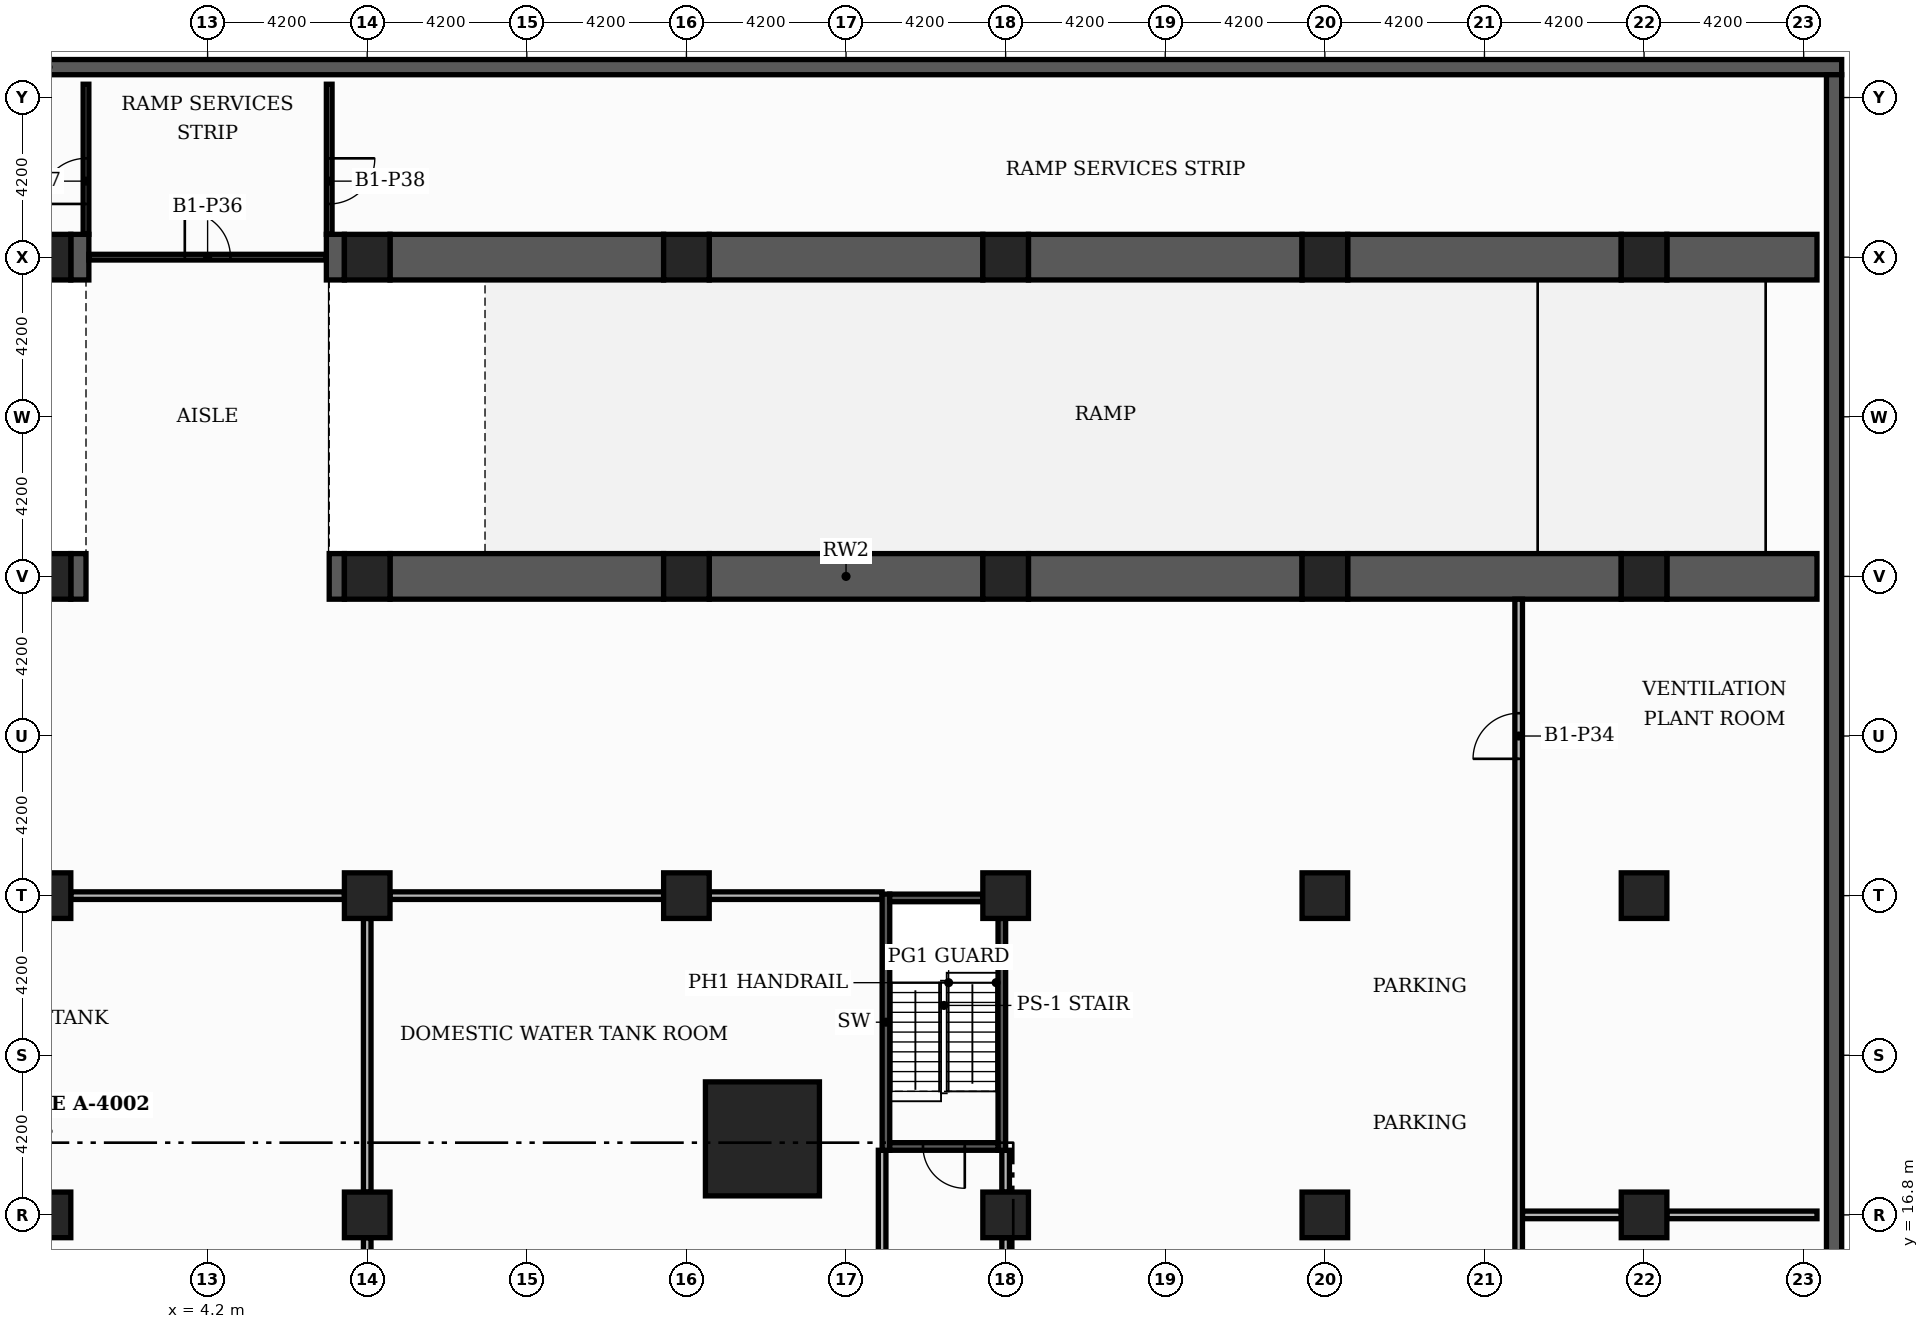
"""IFC4 building model, lengths in metres.
Left out: names, types, materials, properties, quantities, classifications, styles, units other than length and angle.
Written with IfcOpenShell. Run it as: python <this file> out.ifc"""

import sys

from ifc_helpers import new_model, si_unit, direction, frame, frame_2d, origin, origin_2d, place, context, subcontext, project, spatial, rectangle, extrude, element, fill, save


model = new_model("IFC4")
c1 = context("Model", 3, precision=1e-05, world=origin(), true_north=direction((0.0, 1.0)))
c2 = subcontext(c1, "Body", "Model", "MODEL_VIEW")
j1 = project(units=[si_unit("LENGTHUNIT", "METRE"), si_unit("PLANEANGLEUNIT", "RADIAN")], contexts=[c1])
p1 = place(None, origin())
s1 = spatial("IfcSite", under=j1, at=p1, CompositionType="ELEMENT")
p2 = place(p1, origin())
s2 = spatial("IfcBuilding", under=s1, at=p2, CompositionType="ELEMENT")
p3 = place(p2, frame((0.0, 0.0, -4.2)))
s3 = spatial("IfcBuildingStorey", under=s2, at=p3, CompositionType="ELEMENT", Elevation=-4.2)
p4 = place(p3, frame((-47.2, 47.0, 0.0), z_axis=(0.0, 0.0, 1.0), x_axis=(1.0, 0.0, 0.0)))
e1 = element("IfcWall", 1, at=p4, inside=s3, PredefinedType="USERDEFINED", context=c2, shape_type="SweptSolid", body=[
    extrude(rectangle(XDim=94.4, YDim=0.4, at=frame_2d((47.2, 0.0))), origin(), (0.0, 0.0, 1.0), 4.2),
])
p5 = place(p3, frame((47.0, -46.8, 0.0), z_axis=(0.0, 0.0, 1.0), x_axis=(0.0, 1.0, 0.0)))
e2 = element("IfcWall", 2, at=p5, inside=s3, PredefinedType="USERDEFINED", context=c2, shape_type="SweptSolid", body=[
    extrude(rectangle(XDim=93.6, YDim=0.4, at=frame_2d((46.8, 0.0))), origin(), (0.0, 0.0, 1.0), 4.2),
])
p6 = place(p3, frame((18.8, 18.8, 0.0), z_axis=(0.0, 0.0, 1.0), x_axis=(1.0, 0.0, 0.0)))
e3 = element("IfcColumn", 3, at=p6, inside=s3, PredefinedType="COLUMN", context=c2, shape_type="SweptSolid", body=[
    extrude(rectangle(XDim=3.0, YDim=3.0, at=origin_2d()), origin(), (0.0, 0.0, 1.0), 4.2),
])
for number, where, z_axis, x_axis in (
    (4, (25.2, 16.8, 0.0), (0.0, 0.0, 1.0), (1.0, 0.0, 0.0)),
    (5, (0.0, 25.2, 0.0), (0.0, 0.0, 1.0), (1.0, 0.0, 0.0)),
    (6, (8.4, 25.2, 0.0), (0.0, 0.0, 1.0), (1.0, 0.0, 0.0)),
    (7, (16.8, 25.2, 0.0), (0.0, 0.0, 1.0), (1.0, 0.0, 0.0)),
    (8, (0.0, 16.8, 0.0), (0.0, 0.0, 1.0), (1.0, 0.0, 0.0)),
    (9, (0.0, 33.6, 0.0), (0.0, 0.0, 1.0), (1.0, 0.0, 0.0)),
    (10, (0.0, 42.0, 0.0), (0.0, 0.0, 1.0), (1.0, 0.0, 0.0)),
    (11, (8.4, 16.8, 0.0), (0.0, 0.0, 1.0), (1.0, 0.0, 0.0)),
    (12, (8.4, 33.6, 0.0), (0.0, 0.0, 1.0), (1.0, 0.0, 0.0)),
    (13, (8.4, 42.0, 0.0), (0.0, 0.0, 1.0), (1.0, 0.0, 0.0)),
    (14, (16.8, 33.6, 0.0), (0.0, 0.0, 1.0), (1.0, 0.0, 0.0)),
    (15, (16.8, 42.0, 0.0), (0.0, 0.0, 1.0), (1.0, 0.0, 0.0)),
    (16, (25.2, 25.2, 0.0), (0.0, 0.0, 1.0), (1.0, 0.0, 0.0)),
    (17, (25.2, 33.6, 0.0), (0.0, 0.0, 1.0), (1.0, 0.0, 0.0)),
    (18, (25.2, 42.0, 0.0), (0.0, 0.0, 1.0), (1.0, 0.0, 0.0)),
    (19, (33.6, 16.8, 0.0), (0.0, 0.0, 1.0), (1.0, 0.0, 0.0)),
    (20, (33.6, 25.2, 0.0), (0.0, 0.0, 1.0), (1.0, 0.0, 0.0)),
    (21, (33.6, 33.6, 0.0), (0.0, 0.0, 1.0), (1.0, 0.0, 0.0)),
    (22, (33.6, 42.0, 0.0), (0.0, 0.0, 1.0), (1.0, 0.0, 0.0)),
    (23, (42.0, 16.8, 0.0), (0.0, 0.0, 1.0), (1.0, 0.0, 0.0)),
    (24, (42.0, 25.2, 0.0), (0.0, 0.0, 1.0), (1.0, 0.0, 0.0)),
    (25, (42.0, 33.6, 0.0), (0.0, 0.0, 1.0), (1.0, 0.0, 0.0)),
    (26, (42.0, 42.0, 0.0), (0.0, 0.0, 1.0), (1.0, 0.0, 0.0)),
):
    element("IfcColumn", number, at=place(p3, frame(where, z_axis=z_axis, x_axis=x_axis)), inside=s3, PredefinedType="COLUMN", context=c2, shape_type="SweptSolid", body=[
        extrude(rectangle(XDim=1.2, YDim=1.2, at=origin_2d()), origin(), (0.0, 0.0, 1.0), 4.2),
    ])
p7 = place(p3, frame((38.8, 16.8, 0.0), z_axis=(0.0, 0.0, 1.0), x_axis=(1.0, 0.0, 0.0)))
e27 = element("IfcWall", 27, at=p7, inside=s3, PredefinedType="PARTITIONING", context=c2, shape_type="SweptSolid", body=[
    extrude(rectangle(XDim=2.6, YDim=0.2, at=frame_2d((1.3, 0.0))), origin(), (0.0, 0.0, 1.0), 3.78),
])
p8 = place(p3, frame((42.6, 16.8, 0.0), z_axis=(0.0, 0.0, 1.0), x_axis=(1.0, 0.0, 0.0)))
e28 = element("IfcWall", 28, at=p8, inside=s3, PredefinedType="PARTITIONING", context=c2, shape_type="SweptSolid", body=[
    extrude(rectangle(XDim=3.95, YDim=0.2, at=frame_2d((1.975, 0.0))), origin(), (0.0, 0.0, 1.0), 3.78),
])
for number, where, z_axis, x_axis in (
    (29, (0.6, 25.2, 0.0), (0.0, 0.0, 1.0), (1.0, 0.0, 0.0)),
    (30, (9.0, 25.2, 0.0), (0.0, 0.0, 1.0), (1.0, 0.0, 0.0)),
):
    element("IfcWall", number, at=place(p3, frame(where, z_axis=z_axis, x_axis=x_axis)), inside=s3, PredefinedType="PARTITIONING", context=c2, shape_type="SweptSolid", body=[
        extrude(rectangle(XDim=7.2, YDim=0.2, at=frame_2d((3.6, 0.0))), origin(), (0.0, 0.0, 1.0), 3.78),
    ])
p9 = place(p3, frame((17.4, 25.2, 0.0), z_axis=(0.0, 0.0, 1.0), x_axis=(1.0, 0.0, 0.0)))
e31 = element("IfcWall", 31, at=p9, inside=s3, PredefinedType="PARTITIONING", context=c2, shape_type="SweptSolid", body=[
    extrude(rectangle(XDim=4.55, YDim=0.2, at=frame_2d((2.275, 0.0))), origin(), (0.0, 0.0, 1.0), 3.78),
])
p10 = place(p3, frame((0.6, 33.6, 0.0), z_axis=(0.0, 0.0, 1.0), x_axis=(1.0, 0.0, 0.0)))
e32 = element("IfcWall", 32, at=p10, inside=s3, PredefinedType="SOLIDWALL", context=c2, shape_type="SweptSolid", body=[
    extrude(rectangle(XDim=0.4, YDim=1.2, at=frame_2d((0.2, 0.0))), origin(), (0.0, 0.0, 1.0), 3.78),
])
p11 = place(p3, frame((7.4, 33.6, 0.0), z_axis=(0.0, 0.0, 1.0), x_axis=(1.0, 0.0, 0.0)))
e33 = element("IfcWall", 33, at=p11, inside=s3, PredefinedType="SOLIDWALL", context=c2, shape_type="SweptSolid", body=[
    extrude(rectangle(XDim=0.4, YDim=1.2, at=frame_2d((0.2, 0.0))), origin(), (0.0, 0.0, 1.0), 3.78),
])
p12 = place(p3, frame((9.0, 33.6, 0.0), z_axis=(0.0, 0.0, 1.0), x_axis=(1.0, 0.0, 0.0)))
e34 = element("IfcWall", 34, at=p12, inside=s3, PredefinedType="SOLIDWALL", context=c2, shape_type="SweptSolid", body=[
    extrude(rectangle(XDim=7.2, YDim=1.2, at=frame_2d((3.6, 0.0))), origin(), (0.0, 0.0, 1.0), 3.78),
])
p13 = place(p3, frame((17.4, 33.6, 0.0), z_axis=(0.0, 0.0, 1.0), x_axis=(1.0, 0.0, 0.0)))
e35 = element("IfcWall", 35, at=p13, inside=s3, PredefinedType="SOLIDWALL", context=c2, shape_type="SweptSolid", body=[
    extrude(rectangle(XDim=7.2, YDim=1.2, at=frame_2d((3.6, 0.0))), origin(), (0.0, 0.0, 1.0), 3.78),
])
for number, where, z_axis, x_axis in (
    (36, (25.8, 33.6, 0.0), (0.0, 0.0, 1.0), (1.0, 0.0, 0.0)),
    (37, (34.2, 33.6, 0.0), (0.0, 0.0, 1.0), (1.0, 0.0, 0.0)),
):
    element("IfcWall", number, at=place(p3, frame(where, z_axis=z_axis, x_axis=x_axis)), inside=s3, PredefinedType="SOLIDWALL", context=c2, shape_type="SweptSolid", body=[
        extrude(rectangle(XDim=7.2, YDim=1.2, at=frame_2d((3.6, 0.0))), origin(), (0.0, 0.0, 1.0), 3.78),
    ])
p14 = place(p3, frame((42.6, 33.6, 0.0), z_axis=(0.0, 0.0, 1.0), x_axis=(1.0, 0.0, 0.0)))
e38 = element("IfcWall", 38, at=p14, inside=s3, PredefinedType="SOLIDWALL", context=c2, shape_type="SweptSolid", body=[
    extrude(rectangle(XDim=3.95, YDim=1.2, at=frame_2d((1.975, 0.0))), origin(), (0.0, 0.0, 1.0), 3.78),
])
p15 = place(p3, frame((0.6, 42.0, 0.0), z_axis=(0.0, 0.0, 1.0), x_axis=(1.0, 0.0, 0.0)))
e39 = element("IfcWall", 39, at=p15, inside=s3, PredefinedType="SOLIDWALL", context=c2, shape_type="SweptSolid", body=[
    extrude(rectangle(XDim=0.475, YDim=1.2, at=frame_2d((0.237, 0.0))), origin(), (0.0, 0.0, 1.0), 3.78),
])
p16 = place(p3, frame((1.075, 42.0, 0.0), z_axis=(0.0, 0.0, 1.0), x_axis=(1.0, 0.0, 0.0)))
e40 = element("IfcWall", 40, at=p16, inside=s3, PredefinedType="PARTITIONING", context=c2, shape_type="SweptSolid", body=[
    extrude(rectangle(XDim=6.25, YDim=0.15, at=frame_2d((3.125, 0.0))), origin(), (0.0, 0.0, 1.0), 3.78),
])
p17 = place(p16, frame((2.525, 0.0, 0.0)))
e41 = element("IfcOpeningElement", 41, at=p17, cuts=e40, PredefinedType="OPENING", context=c2, shape_type="SweptSolid", body=[
    extrude(rectangle(XDim=1.2, YDim=2.2, at=frame_2d((0.6, 1.1))), frame((0.0, 0.085, 0.0), z_axis=(0.0, -1.0, 0.0), x_axis=(1.0, 0.0, 0.0)), (0.0, 0.0, 1.0), 0.17),
])
p18 = place(p3, frame((7.325, 42.0, 0.0), z_axis=(0.0, 0.0, 1.0), x_axis=(1.0, 0.0, 0.0)))
e42 = element("IfcWall", 42, at=p18, inside=s3, PredefinedType="SOLIDWALL", context=c2, shape_type="SweptSolid", body=[
    extrude(rectangle(XDim=0.475, YDim=1.2, at=frame_2d((0.238, 0.0))), origin(), (0.0, 0.0, 1.0), 3.78),
])
p19 = place(p3, frame((9.0, 42.0, 0.0), z_axis=(0.0, 0.0, 1.0), x_axis=(1.0, 0.0, 0.0)))
e43 = element("IfcWall", 43, at=p19, inside=s3, PredefinedType="SOLIDWALL", context=c2, shape_type="SweptSolid", body=[
    extrude(rectangle(XDim=7.2, YDim=1.2, at=frame_2d((3.6, 0.0))), origin(), (0.0, 0.0, 1.0), 3.78),
])
p20 = place(p3, frame((17.4, 42.0, 0.0), z_axis=(0.0, 0.0, 1.0), x_axis=(1.0, 0.0, 0.0)))
e44 = element("IfcWall", 44, at=p20, inside=s3, PredefinedType="SOLIDWALL", context=c2, shape_type="SweptSolid", body=[
    extrude(rectangle(XDim=7.2, YDim=1.2, at=frame_2d((3.6, 0.0))), origin(), (0.0, 0.0, 1.0), 3.78),
])
for number, where, z_axis, x_axis in (
    (45, (25.8, 42.0, 0.0), (0.0, 0.0, 1.0), (1.0, 0.0, 0.0)),
    (46, (34.2, 42.0, 0.0), (0.0, 0.0, 1.0), (1.0, 0.0, 0.0)),
):
    element("IfcWall", number, at=place(p3, frame(where, z_axis=z_axis, x_axis=x_axis)), inside=s3, PredefinedType="SOLIDWALL", context=c2, shape_type="SweptSolid", body=[
        extrude(rectangle(XDim=7.2, YDim=1.2, at=frame_2d((3.6, 0.0))), origin(), (0.0, 0.0, 1.0), 3.78),
    ])
p21 = place(p3, frame((42.6, 42.0, 0.0), z_axis=(0.0, 0.0, 1.0), x_axis=(1.0, 0.0, 0.0)))
e47 = element("IfcWall", 47, at=p21, inside=s3, PredefinedType="SOLIDWALL", context=c2, shape_type="SweptSolid", body=[
    extrude(rectangle(XDim=3.95, YDim=1.2, at=frame_2d((1.975, 0.0))), origin(), (0.0, 0.0, 1.0), 3.78),
])
p22 = place(p3, frame((1.0, 42.6, 0.0), z_axis=(0.0, 0.0, 1.0), x_axis=(0.0, 1.0, 0.0)))
e48 = element("IfcWall", 48, at=p22, inside=s3, PredefinedType="PARTITIONING", context=c2, shape_type="SweptSolid", body=[
    extrude(rectangle(XDim=3.95, YDim=0.15, at=frame_2d((1.975, 0.0))), origin(), (0.0, 0.0, 1.0), 3.78),
])
p23 = place(p22, frame((0.8, 0.0, 0.0)))
e49 = element("IfcOpeningElement", 49, at=p23, cuts=e48, PredefinedType="OPENING", context=c2, shape_type="SweptSolid", body=[
    extrude(rectangle(XDim=1.2, YDim=2.2, at=frame_2d((0.6, 1.1))), frame((0.0, 0.085, 0.0), z_axis=(0.0, -1.0, 0.0), x_axis=(1.0, 0.0, 0.0)), (0.0, 0.0, 1.0), 0.17),
])
p24 = place(p3, frame((7.4, 42.6, 0.0), z_axis=(0.0, 0.0, 1.0), x_axis=(0.0, 1.0, 0.0)))
e50 = element("IfcWall", 50, at=p24, inside=s3, PredefinedType="PARTITIONING", context=c2, shape_type="SweptSolid", body=[
    extrude(rectangle(XDim=3.95, YDim=0.15, at=frame_2d((1.975, 0.0))), origin(), (0.0, 0.0, 1.0), 3.78),
])
p25 = place(p24, frame((0.8, 0.0, 0.0)))
e51 = element("IfcOpeningElement", 51, at=p25, cuts=e50, PredefinedType="OPENING", context=c2, shape_type="SweptSolid", body=[
    extrude(rectangle(XDim=1.2, YDim=2.2, at=frame_2d((0.6, 1.1))), frame((0.0, 0.085, 0.0), z_axis=(0.0, -1.0, 0.0), x_axis=(1.0, 0.0, 0.0)), (0.0, 0.0, 1.0), 0.17),
])
p26 = place(p3, frame((8.4, 14.5, 0.0), z_axis=(0.0, 0.0, 1.0), x_axis=(0.0, 1.0, 0.0)))
e52 = element("IfcWall", 52, at=p26, inside=s3, PredefinedType="PARTITIONING", context=c2, shape_type="SweptSolid", body=[
    extrude(rectangle(XDim=1.7, YDim=0.2, at=frame_2d((0.85, 0.0))), origin(), (0.0, 0.0, 1.0), 3.78),
])
p27 = place(p3, frame((8.4, 17.4, 0.0), z_axis=(0.0, 0.0, 1.0), x_axis=(0.0, 1.0, 0.0)))
e53 = element("IfcWall", 53, at=p27, inside=s3, PredefinedType="PARTITIONING", context=c2, shape_type="SweptSolid", body=[
    extrude(rectangle(XDim=7.2, YDim=0.2, at=frame_2d((3.6, 0.0))), origin(), (0.0, 0.0, 1.0), 3.78),
])
p28 = place(p3, frame((21.95, 14.5, 0.0), z_axis=(0.0, 0.0, 1.0), x_axis=(0.0, 1.0, 0.0)))
e54 = element("IfcWall", 54, at=p28, inside=s3, PredefinedType="PARTITIONING", context=c2, shape_type="SweptSolid", body=[
    extrude(rectangle(XDim=4.0, YDim=0.2, at=frame_2d((2.0, 0.0))), origin(), (0.0, 0.0, 1.0), 3.78),
])
p29 = place(p3, frame((25.2, 14.5, 0.0), z_axis=(0.0, 0.0, 1.0), x_axis=(0.0, 1.0, 0.0)))
e55 = element("IfcWall", 55, at=p29, inside=s3, PredefinedType="PARTITIONING", context=c2, shape_type="SweptSolid", body=[
    extrude(rectangle(XDim=1.7, YDim=0.2, at=frame_2d((0.85, 0.0))), origin(), (0.0, 0.0, 1.0), 3.78),
])
p30 = place(p3, frame((25.2, 17.4, 0.0), z_axis=(0.0, 0.0, 1.0), x_axis=(0.0, 1.0, 0.0)))
e56 = element("IfcWall", 56, at=p30, inside=s3, PredefinedType="PARTITIONING", context=c2, shape_type="SweptSolid", body=[
    extrude(rectangle(XDim=1.1, YDim=0.2, at=frame_2d((0.55, 0.0))), origin(), (0.0, 0.0, 1.0), 3.78),
])
p31 = place(p3, frame((38.7, -38.6, 0.0), z_axis=(0.0, 0.0, 1.0), x_axis=(0.0, 1.0, 0.0)))
e57 = element("IfcWall", 57, at=p31, inside=s3, PredefinedType="PARTITIONING", context=c2, shape_type="SweptSolid", body=[
    extrude(rectangle(XDim=71.6, YDim=0.2, at=frame_2d((35.8, 0.0))), origin(), (0.0, 0.0, 1.0), 3.78),
])
p32 = place(p31, frame((8.6, 0.0, 0.0)))
e58 = element("IfcOpeningElement", 58, at=p32, cuts=e57, PredefinedType="OPENING", context=c2, shape_type="SweptSolid", body=[
    extrude(rectangle(XDim=1.2, YDim=2.2, at=frame_2d((0.6, 1.1))), frame((0.0, 0.11, 0.0), z_axis=(0.0, -1.0, 0.0), x_axis=(1.0, 0.0, 0.0)), (0.0, 0.0, 1.0), 0.22),
])
p33 = place(p31, frame((33.8, 0.0, 0.0)))
e59 = element("IfcOpeningElement", 59, at=p33, cuts=e57, PredefinedType="OPENING", context=c2, shape_type="SweptSolid", body=[
    extrude(rectangle(XDim=1.2, YDim=2.2, at=frame_2d((0.6, 1.1))), frame((0.0, 0.11, 0.0), z_axis=(0.0, -1.0, 0.0), x_axis=(1.0, 0.0, 0.0)), (0.0, 0.0, 1.0), 0.22),
])
p34 = place(p31, frame((50.6, 0.0, 0.0)))
e60 = element("IfcOpeningElement", 60, at=p34, cuts=e57, PredefinedType="OPENING", context=c2, shape_type="SweptSolid", body=[
    extrude(rectangle(XDim=1.2, YDim=2.2, at=frame_2d((0.6, 1.1))), frame((0.0, 0.11, 0.0), z_axis=(0.0, -1.0, 0.0), x_axis=(1.0, 0.0, 0.0)), (0.0, 0.0, 1.0), 0.22),
])
p35 = place(p31, frame((67.4, 0.0, 0.0)))
e61 = element("IfcOpeningElement", 61, at=p35, cuts=e57, PredefinedType="OPENING", context=c2, shape_type="SweptSolid", body=[
    extrude(rectangle(XDim=1.2, YDim=2.2, at=frame_2d((0.6, 1.1))), frame((0.0, 0.11, 0.0), z_axis=(0.0, -1.0, 0.0), x_axis=(1.0, 0.0, 0.0)), (0.0, 0.0, 1.0), 0.22),
])
p36 = place(p3, frame((22.05, 18.5, 0.0), z_axis=(0.0, 0.0, 1.0), x_axis=(0.0, 1.0, 0.0)))
e62 = element("IfcWall", 62, at=p36, inside=s3, PredefinedType="SOLIDWALL", context=c2, shape_type="SweptSolid", body=[
    extrude(rectangle(XDim=6.74, YDim=0.2, at=frame_2d((3.37, 0.0))), origin(), (0.0, 0.0, 1.0), 3.78),
])
p37 = place(p3, frame((25.1, 18.5, 0.0), z_axis=(0.0, 0.0, 1.0), x_axis=(0.0, 1.0, 0.0)))
e63 = element("IfcWall", 63, at=p37, inside=s3, PredefinedType="SOLIDWALL", context=c2, shape_type="SweptSolid", body=[
    extrude(rectangle(XDim=6.1, YDim=0.2, at=frame_2d((3.05, 0.0))), origin(), (0.0, 0.0, 1.0), 3.78),
])
p38 = place(p3, frame((22.15, 18.6, 0.0), z_axis=(0.0, 0.0, 1.0), x_axis=(1.0, 0.0, 0.0)))
e64 = element("IfcWall", 64, at=p38, inside=s3, PredefinedType="SOLIDWALL", context=c2, shape_type="SweptSolid", body=[
    extrude(rectangle(XDim=2.85, YDim=0.2, at=frame_2d((1.425, 0.0))), origin(), (0.0, 0.0, 1.0), 3.78),
])
p39 = place(p38, frame((0.875, 0.0, 0.0)))
e65 = element("IfcOpeningElement", 65, at=p39, cuts=e64, PredefinedType="OPENING", context=c2, shape_type="SweptSolid", body=[
    extrude(rectangle(XDim=1.1, YDim=2.2, at=frame_2d((0.55, 1.1))), frame((0.0, 0.11, 0.0), z_axis=(0.0, -1.0, 0.0), x_axis=(1.0, 0.0, 0.0)), (0.0, 0.0, 1.0), 0.22),
])
p40 = place(p3, frame((22.15, 25.14, 0.0), z_axis=(0.0, 0.0, 1.0), x_axis=(1.0, 0.0, 0.0)))
e66 = element("IfcWall", 66, at=p40, inside=s3, PredefinedType="SOLIDWALL", context=c2, shape_type="SweptSolid", body=[
    extrude(rectangle(XDim=2.45, YDim=0.2, at=frame_2d((1.225, 0.0))), origin(), (0.0, 0.0, 1.0), 3.78),
])
p41 = place(p35, origin())
e67 = element("IfcDoor", 67, at=p41, inside=s3, OperationType="SINGLE_SWING_LEFT", PredefinedType="DOOR", context=c2, shape_type="SweptSolid", body=[
    extrude(rectangle(XDim=1.2, YDim=2.2, at=frame_2d((0.6, 1.1))), frame((0.0, 0.025, 0.0), z_axis=(0.0, -1.0, 0.0), x_axis=(1.0, 0.0, 0.0)), (0.0, 0.0, 1.0), 0.05),
])
fill(e61, e67)
p42 = place(p17, origin())
e68 = element("IfcDoor", 68, at=p42, inside=s3, OperationType="SINGLE_SWING_LEFT", PredefinedType="DOOR", context=c2, shape_type="SweptSolid", body=[
    extrude(rectangle(XDim=1.2, YDim=2.2, at=frame_2d((0.6, 1.1))), frame((0.0, 0.025, 0.0), z_axis=(0.0, -1.0, 0.0), x_axis=(1.0, 0.0, 0.0)), (0.0, 0.0, 1.0), 0.05),
])
fill(e41, e68)
p43 = place(p23, origin())
e69 = element("IfcDoor", 69, at=p43, inside=s3, OperationType="SINGLE_SWING_LEFT", PredefinedType="DOOR", context=c2, shape_type="SweptSolid", body=[
    extrude(rectangle(XDim=1.2, YDim=2.2, at=frame_2d((0.6, 1.1))), frame((0.0, 0.025, 0.0), z_axis=(0.0, -1.0, 0.0), x_axis=(1.0, 0.0, 0.0)), (0.0, 0.0, 1.0), 0.05),
])
fill(e49, e69)
p44 = place(p25, origin())
e70 = element("IfcDoor", 70, at=p44, inside=s3, OperationType="SINGLE_SWING_RIGHT", PredefinedType="DOOR", context=c2, shape_type="SweptSolid", body=[
    extrude(rectangle(XDim=1.2, YDim=2.2, at=frame_2d((0.6, 1.1))), frame((0.0, 0.025, 0.0), z_axis=(0.0, -1.0, 0.0), x_axis=(1.0, 0.0, 0.0)), (0.0, 0.0, 1.0), 0.05),
])
fill(e51, e70)
p45 = place(p39, origin())
e71 = element("IfcDoor", 71, at=p45, inside=s3, OperationType="SINGLE_SWING_RIGHT", PredefinedType="DOOR", context=c2, shape_type="SweptSolid", body=[
    extrude(rectangle(XDim=1.1, YDim=2.2, at=frame_2d((0.55, 1.1))), frame((0.0, 0.025, 0.0), z_axis=(0.0, -1.0, 0.0), x_axis=(1.0, 0.0, 0.0)), (0.0, 0.0, 1.0), 0.05),
])
fill(e65, e71)
save(model, sys.argv[1])
